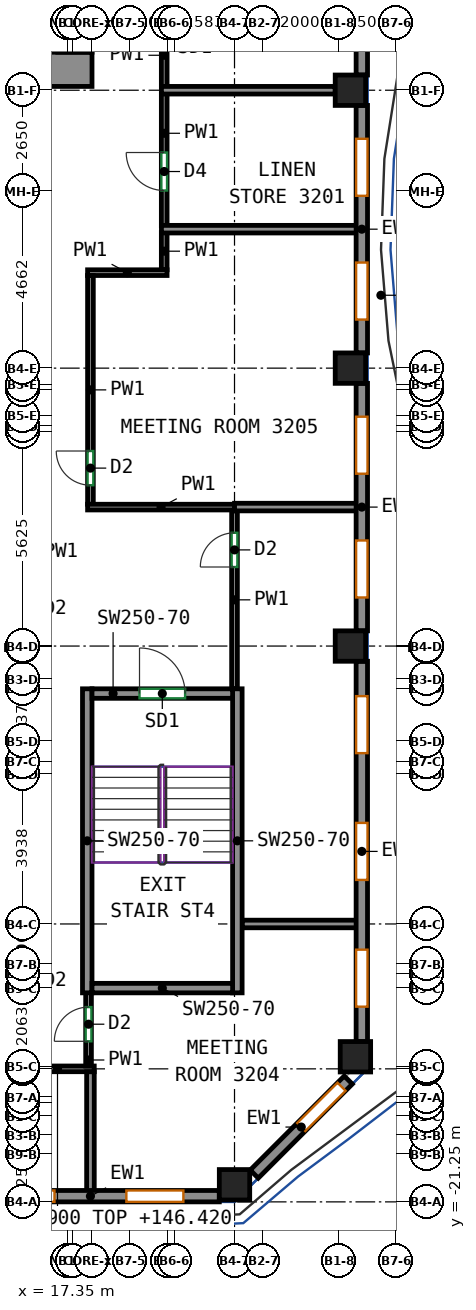
"""IFC4 building model, lengths in metres.
Left out: names, types, materials, properties, quantities, classifications, styles, units other than length and angle.
Written with IfcOpenShell. Run it as: python <this file> out.ifc"""

import sys

from ifc_helpers import new_model, si_unit, direction, frame, frame_2d, origin, origin_2d, place, context, subcontext, project, spatial, rectangle, extrude, source, transform, mapped, element, fill, save


model = new_model("IFC4")
c1 = context("Model", 3, precision=1e-05, world=origin(), true_north=direction((0.0, 1.0)))
c2 = subcontext(c1, "Body", "Model", "MODEL_VIEW")
j1 = project(units=[si_unit("LENGTHUNIT", "METRE"), si_unit("PLANEANGLEUNIT", "RADIAN")], contexts=[c1])
p1 = place(None, origin())
s1 = spatial("IfcSite", under=j1, at=p1, CompositionType="ELEMENT")
p2 = place(p1, origin())
s2 = spatial("IfcBuilding", under=s1, at=p2, CompositionType="ELEMENT")
p3 = place(p2, frame((0.0, 0.0, 143.9)))
s3 = spatial("IfcBuildingStorey", under=s2, at=p3, CompositionType="ELEMENT", Elevation=143.9)
m1 = source(origin(), c2, "Body", "SweptSolid", [
    extrude(rectangle(XDim=0.8, YDim=0.8, at=origin_2d()), origin(), (0.0, 0.0, 1.0), 3.12),
])
for number, where, z_axis, x_axis in (
    (1, (21.75, -20.8, 0.0), (0.0, 0.0, 1.0), (1.0, 0.0, 0.0)),
    (2, (24.8, -6.625, 0.0), (0.0, 0.0, 1.0), (1.0, 0.0, 0.0)),
    (3, (24.8, 0.688, 0.0), (0.0, 0.0, 1.0), (1.0, 0.0, 0.0)),
    (4, (24.8, 8.0, 0.0), (0.0, 0.0, 1.0), (1.0, 0.0, 0.0)),
    (5, (24.932, -17.432, 0.0), (0.0, 0.0, 1.0), (1.0, 0.0, 0.0)),
):
    element("IfcColumn", number, at=place(p3, frame(where, z_axis=z_axis, x_axis=x_axis)), inside=s3, PredefinedType="COLUMN", context=c2, shape_type="MappedRepresentation", body=[
        mapped(m1, transform((0.0, 0.0, 0.0))),
    ])
m2 = source(origin(), c2, "Body", "SweptSolid", [
    extrude(rectangle(XDim=5.53, YDim=0.9, at=frame_2d((2.765, 0.0))), origin(), (0.0, 0.0, 1.0), 3.12),
])
p4 = place(p3, frame((12.47, 8.55, 0.0), z_axis=(0.0, 0.0, 1.0), x_axis=(1.0, 0.0, 0.0)))
e6 = element("IfcWall", 6, at=p4, inside=s3, PredefinedType="SHEAR", context=c2, shape_type="MappedRepresentation", body=[
    mapped(m2, transform((0.0, 0.0, 0.0))),
])
p5 = place(p4, frame((2.18, 0.0, 0.0)))
e7 = element("IfcOpeningElement", 7, at=p5, cuts=e6, PredefinedType="OPENING", context=c2, shape_type="SweptSolid", body=[
    extrude(rectangle(XDim=1.2, YDim=2.1, at=frame_2d((0.6, 1.05))), frame((0.0, 0.46, 0.0), z_axis=(0.0, -1.0, 0.0), x_axis=(1.0, 0.0, 0.0)), (0.0, 0.0, 1.0), 0.92),
])
m3 = source(origin(), c2, "Body", "SweptSolid", [
    extrude(rectangle(XDim=8.0, YDim=0.25, at=frame_2d((4.0, 0.0))), origin(), (0.0, 0.0, 1.0), 3.12),
])
for number, where, z_axis, x_axis in (
    (8, (17.875, -15.75, 0.0), (0.0, 0.0, 1.0), (0.0, 1.0, 0.0)),
    (9, (21.825, -15.75, 0.0), (0.0, 0.0, 1.0), (0.0, 1.0, 0.0)),
):
    element("IfcWall", number, at=place(p3, frame(where, z_axis=z_axis, x_axis=x_axis)), inside=s3, PredefinedType="SHEAR", context=c2, shape_type="MappedRepresentation", body=[
        mapped(m3, transform((0.0, 0.0, 0.0))),
    ])
m4 = source(origin(), c2, "Body", "SweptSolid", [
    extrude(rectangle(XDim=3.7, YDim=0.25, at=frame_2d((1.85, 0.0))), origin(), (0.0, 0.0, 1.0), 3.12),
])
p6 = place(p3, frame((18.0, -15.625, 0.0), z_axis=(0.0, 0.0, 1.0), x_axis=(1.0, 0.0, 0.0)))
e10 = element("IfcWall", 10, at=p6, inside=s3, PredefinedType="SHEAR", context=c2, shape_type="MappedRepresentation", body=[
    mapped(m4, transform((0.0, 0.0, 0.0))),
])
p7 = place(p3, frame((18.0, -7.875, 0.0), z_axis=(0.0, 0.0, 1.0), x_axis=(1.0, 0.0, 0.0)))
e11 = element("IfcWall", 11, at=p7, inside=s3, PredefinedType="SHEAR", context=c2, shape_type="MappedRepresentation", body=[
    mapped(m4, transform((0.0, 0.0, 0.0))),
])
p8 = place(p7, frame((1.25, 0.0, 0.0)))
e12 = element("IfcOpeningElement", 12, at=p8, cuts=e11, PredefinedType="OPENING", context=c2, shape_type="SweptSolid", body=[
    extrude(rectangle(XDim=1.2, YDim=2.1, at=frame_2d((0.6, 1.05))), frame((0.0, 0.135, 0.0), z_axis=(0.0, -1.0, 0.0), x_axis=(1.0, 0.0, 0.0)), (0.0, 0.0, 1.0), 0.27),
])
m5 = source(origin(), c2, "Body", "SweptSolid", [
    extrude(rectangle(XDim=6.783, YDim=0.3, at=frame_2d((3.392, 0.0))), origin(), (0.0, 0.0, 1.0), 3.12),
])
p9 = place(p3, frame((14.567, -21.1, 0.0), z_axis=(0.0, 0.0, 1.0), x_axis=(1.0, 0.0, 0.0)))
e13 = element("IfcWall", 13, at=p9, inside=s3, PredefinedType="SOLIDWALL", context=c2, shape_type="MappedRepresentation", body=[
    mapped(m5, transform((0.0, 0.0, 0.0))),
])
p10 = place(p9, frame((0.946, 0.0, 0.85)))
e14 = element("IfcOpeningElement", 14, at=p10, cuts=e13, PredefinedType="OPENING", context=c2, shape_type="SweptSolid", body=[
    extrude(rectangle(XDim=1.5, YDim=1.95, at=frame_2d((0.75, 0.975))), frame((0.0, 0.16, 0.0), z_axis=(0.0, -1.0, 0.0), x_axis=(1.0, 0.0, 0.0)), (0.0, 0.0, 1.0), 0.32),
])
p11 = place(p9, frame((4.337, 0.0, 0.85)))
e15 = element("IfcOpeningElement", 15, at=p11, cuts=e13, PredefinedType="OPENING", context=c2, shape_type="SweptSolid", body=[
    extrude(rectangle(XDim=1.5, YDim=1.95, at=frame_2d((0.75, 0.975))), frame((0.0, 0.16, 0.0), z_axis=(0.0, -1.0, 0.0), x_axis=(1.0, 0.0, 0.0)), (0.0, 0.0, 1.0), 0.32),
])
m6 = source(origin(), c2, "Body", "SweptSolid", [
    extrude(rectangle(XDim=3.5, YDim=0.3, at=frame_2d((1.75, 0.0))), origin(), (0.0, 0.0, 1.0), 3.12),
])
p12 = place(p3, frame((22.269, -20.519, 0.0), z_axis=(0.0, 0.0, 1.0), x_axis=(0.707141656123, 0.70707190453, 0.0)))
e16 = element("IfcWall", 16, at=p12, inside=s3, PredefinedType="SOLIDWALL", context=c2, shape_type="MappedRepresentation", body=[
    mapped(m6, transform((0.0, 0.0, 0.0))),
])
p13 = place(p12, frame((1.75, 0.0, 0.85)))
e17 = element("IfcOpeningElement", 17, at=p13, cuts=e16, PredefinedType="OPENING", context=c2, shape_type="SweptSolid", body=[
    extrude(rectangle(XDim=1.5, YDim=1.95, at=frame_2d((0.75, 0.975))), frame((0.0, 0.16, 0.0), z_axis=(0.0, -1.0, 0.0), x_axis=(1.0, 0.0, 0.0)), (0.0, 0.0, 1.0), 0.32),
])
m7 = source(origin(), c2, "Body", "SweptSolid", [
    extrude(rectangle(XDim=10.007, YDim=0.3, at=frame_2d((5.003, 0.0))), origin(), (0.0, 0.0, 1.0), 3.12),
])
p14 = place(p3, frame((25.1, -17.032, 0.0), z_axis=(0.0, 0.0, 1.0), x_axis=(0.0, 1.0, 0.0)))
e18 = element("IfcWall", 18, at=p14, inside=s3, PredefinedType="SOLIDWALL", context=c2, shape_type="MappedRepresentation", body=[
    mapped(m7, transform((0.0, 0.0, 0.0))),
])
p15 = place(p14, frame((0.918, 0.0, 0.85)))
e19 = element("IfcOpeningElement", 19, at=p15, cuts=e18, PredefinedType="OPENING", context=c2, shape_type="SweptSolid", body=[
    extrude(rectangle(XDim=1.5, YDim=1.95, at=frame_2d((0.75, 0.975))), frame((0.0, 0.16, 0.0), z_axis=(0.0, -1.0, 0.0), x_axis=(1.0, 0.0, 0.0)), (0.0, 0.0, 1.0), 0.32),
])
p16 = place(p14, frame((4.253, 0.0, 0.85)))
e20 = element("IfcOpeningElement", 20, at=p16, cuts=e18, PredefinedType="OPENING", context=c2, shape_type="SweptSolid", body=[
    extrude(rectangle(XDim=1.5, YDim=1.95, at=frame_2d((0.75, 0.975))), frame((0.0, 0.16, 0.0), z_axis=(0.0, -1.0, 0.0), x_axis=(1.0, 0.0, 0.0)), (0.0, 0.0, 1.0), 0.32),
])
p17 = place(p14, frame((7.589, 0.0, 0.85)))
e21 = element("IfcOpeningElement", 21, at=p17, cuts=e18, PredefinedType="OPENING", context=c2, shape_type="SweptSolid", body=[
    extrude(rectangle(XDim=1.5, YDim=1.95, at=frame_2d((0.75, 0.975))), frame((0.0, 0.16, 0.0), z_axis=(0.0, -1.0, 0.0), x_axis=(1.0, 0.0, 0.0)), (0.0, 0.0, 1.0), 0.32),
])
m8 = source(origin(), c2, "Body", "SweptSolid", [
    extrude(rectangle(XDim=6.513, YDim=0.3, at=frame_2d((3.256, 0.0))), origin(), (0.0, 0.0, 1.0), 3.12),
])
p18 = place(p3, frame((25.1, -6.225, 0.0), z_axis=(0.0, 0.0, 1.0), x_axis=(0.0, 1.0, 0.0)))
e22 = element("IfcWall", 22, at=p18, inside=s3, PredefinedType="SOLIDWALL", context=c2, shape_type="MappedRepresentation", body=[
    mapped(m8, transform((0.0, 0.0, 0.0))),
])
p19 = place(p18, frame((0.878, 0.0, 0.85)))
e23 = element("IfcOpeningElement", 23, at=p19, cuts=e22, PredefinedType="OPENING", context=c2, shape_type="SweptSolid", body=[
    extrude(rectangle(XDim=1.5, YDim=1.95, at=frame_2d((0.75, 0.975))), frame((0.0, 0.16, 0.0), z_axis=(0.0, -1.0, 0.0), x_axis=(1.0, 0.0, 0.0)), (0.0, 0.0, 1.0), 0.32),
])
p20 = place(p18, frame((4.135, 0.0, 0.85)))
e24 = element("IfcOpeningElement", 24, at=p20, cuts=e22, PredefinedType="OPENING", context=c2, shape_type="SweptSolid", body=[
    extrude(rectangle(XDim=1.5, YDim=1.95, at=frame_2d((0.75, 0.975))), frame((0.0, 0.16, 0.0), z_axis=(0.0, -1.0, 0.0), x_axis=(1.0, 0.0, 0.0)), (0.0, 0.0, 1.0), 0.32),
])
p21 = place(p3, frame((25.1, 1.087, 0.0), z_axis=(0.0, 0.0, 1.0), x_axis=(0.0, 1.0, 0.0)))
e25 = element("IfcWall", 25, at=p21, inside=s3, PredefinedType="SOLIDWALL", context=c2, shape_type="MappedRepresentation", body=[
    mapped(m8, transform((0.0, 0.0, 0.0))),
])
p22 = place(p21, frame((0.878, 0.0, 0.85)))
e26 = element("IfcOpeningElement", 26, at=p22, cuts=e25, PredefinedType="OPENING", context=c2, shape_type="SweptSolid", body=[
    extrude(rectangle(XDim=1.5, YDim=1.95, at=frame_2d((0.75, 0.975))), frame((0.0, 0.16, 0.0), z_axis=(0.0, -1.0, 0.0), x_axis=(1.0, 0.0, 0.0)), (0.0, 0.0, 1.0), 0.32),
])
p23 = place(p21, frame((4.135, 0.0, 0.85)))
e27 = element("IfcOpeningElement", 27, at=p23, cuts=e25, PredefinedType="OPENING", context=c2, shape_type="SweptSolid", body=[
    extrude(rectangle(XDim=1.5, YDim=1.95, at=frame_2d((0.75, 0.975))), frame((0.0, 0.16, 0.0), z_axis=(0.0, -1.0, 0.0), x_axis=(1.0, 0.0, 0.0)), (0.0, 0.0, 1.0), 0.32),
])
m9 = source(origin(), c2, "Body", "SweptSolid", [
    extrude(rectangle(XDim=13.2, YDim=0.3, at=frame_2d((6.6, 0.0))), origin(), (0.0, 0.0, 1.0), 3.12),
])
p24 = place(p3, frame((25.1, 8.4, 0.0), z_axis=(0.0, 0.0, 1.0), x_axis=(0.0, 1.0, 0.0)))
e28 = element("IfcWall", 28, at=p24, inside=s3, PredefinedType="SOLIDWALL", context=c2, shape_type="MappedRepresentation", body=[
    mapped(m9, transform((0.0, 0.0, 0.0))),
])
p25 = place(p24, frame((0.9, 0.0, 0.85)))
e29 = element("IfcOpeningElement", 29, at=p25, cuts=e28, PredefinedType="OPENING", context=c2, shape_type="SweptSolid", body=[
    extrude(rectangle(XDim=1.5, YDim=1.95, at=frame_2d((0.75, 0.975))), frame((0.0, 0.16, 0.0), z_axis=(0.0, -1.0, 0.0), x_axis=(1.0, 0.0, 0.0)), (0.0, 0.0, 1.0), 0.32),
])
p26 = place(p24, frame((4.2, 0.0, 0.85)))
e30 = element("IfcOpeningElement", 30, at=p26, cuts=e28, PredefinedType="OPENING", context=c2, shape_type="SweptSolid", body=[
    extrude(rectangle(XDim=1.5, YDim=1.95, at=frame_2d((0.75, 0.975))), frame((0.0, 0.16, 0.0), z_axis=(0.0, -1.0, 0.0), x_axis=(1.0, 0.0, 0.0)), (0.0, 0.0, 1.0), 0.32),
])
p27 = place(p24, frame((7.5, 0.0, 0.85)))
e31 = element("IfcOpeningElement", 31, at=p27, cuts=e28, PredefinedType="OPENING", context=c2, shape_type="SweptSolid", body=[
    extrude(rectangle(XDim=1.5, YDim=1.95, at=frame_2d((0.75, 0.975))), frame((0.0, 0.16, 0.0), z_axis=(0.0, -1.0, 0.0), x_axis=(1.0, 0.0, 0.0)), (0.0, 0.0, 1.0), 0.32),
])
p28 = place(p24, frame((10.8, 0.0, 0.85)))
e32 = element("IfcOpeningElement", 32, at=p28, cuts=e28, PredefinedType="OPENING", context=c2, shape_type="SweptSolid", body=[
    extrude(rectangle(XDim=1.5, YDim=1.95, at=frame_2d((0.75, 0.975))), frame((0.0, 0.16, 0.0), z_axis=(0.0, -1.0, 0.0), x_axis=(1.0, 0.0, 0.0)), (0.0, 0.0, 1.0), 0.32),
])
p29 = place(p3, frame((16.125, -17.75, 0.0), z_axis=(0.0, 0.0, 1.0), x_axis=(1.0, 0.0, 0.0)))
e33 = element("IfcWall", 33, at=p29, inside=s3, PredefinedType="PARTITIONING", context=c2, shape_type="SweptSolid", body=[
    extrude(rectangle(XDim=1.934, YDim=0.15, at=frame_2d((0.967, 0.0))), origin(), (0.0, 0.0, 1.0), 2.52),
])
p30 = place(p3, frame((17.909, -17.675, 0.0), z_axis=(0.0, 0.0, 1.0), x_axis=(0.0, 1.0, 0.0)))
e34 = element("IfcWall", 34, at=p30, inside=s3, PredefinedType="PARTITIONING", context=c2, shape_type="SweptSolid", body=[
    extrude(rectangle(XDim=1.975, YDim=0.15, at=frame_2d((0.988, 0.0))), origin(), (0.0, 0.0, 1.0), 3.12),
])
p31 = place(p30, frame((0.65, 0.0, 0.0)))
e35 = element("IfcOpeningElement", 35, at=p31, cuts=e34, PredefinedType="OPENING", context=c2, shape_type="SweptSolid", body=[
    extrude(rectangle(XDim=0.9, YDim=2.1, at=frame_2d((0.45, 1.05))), frame((0.0, 0.085, 0.0), z_axis=(0.0, -1.0, 0.0), x_axis=(1.0, 0.0, 0.0)), (0.0, 0.0, 1.0), 0.17),
])
p32 = place(p3, frame((19.9, 4.434, 0.0), z_axis=(0.0, 0.0, 1.0), x_axis=(0.0, 1.0, 0.0)))
e36 = element("IfcWall", 36, at=p32, inside=s3, PredefinedType="PARTITIONING", context=c2, shape_type="SweptSolid", body=[
    extrude(rectangle(XDim=3.476, YDim=0.15, at=frame_2d((1.738, 0.0))), origin(), (0.0, 0.0, 1.0), 3.12),
])
p33 = place(p32, frame((0.927, 0.0, 0.0)))
e37 = element("IfcOpeningElement", 37, at=p33, cuts=e36, PredefinedType="OPENING", context=c2, shape_type="SweptSolid", body=[
    extrude(rectangle(XDim=1.0, YDim=2.1, at=frame_2d((0.5, 1.05))), frame((0.0, 0.085, 0.0), z_axis=(0.0, -1.0, 0.0), x_axis=(1.0, 0.0, 0.0)), (0.0, 0.0, 1.0), 0.17),
])
p34 = place(p3, frame((19.9, 8.09, 0.0), z_axis=(0.0, 0.0, 1.0), x_axis=(0.0, 1.0, 0.0)))
e38 = element("IfcWall", 38, at=p34, inside=s3, PredefinedType="PARTITIONING", context=c2, shape_type="SweptSolid", body=[
    extrude(rectangle(XDim=1.66, YDim=0.15, at=frame_2d((0.83, 0.0))), origin(), (0.0, 0.0, 1.0), 3.12),
])
p35 = place(p3, frame((19.9, 3.275, 0.0), z_axis=(0.0, 0.0, 1.0), x_axis=(0.0, 1.0, 0.0)))
e39 = element("IfcWall", 39, at=p35, inside=s3, PredefinedType="PARTITIONING", context=c2, shape_type="SweptSolid", body=[
    extrude(rectangle(XDim=0.979, YDim=0.15, at=frame_2d((0.49, 0.0))), origin(), (0.0, 0.0, 1.0), 3.12),
])
p36 = place(p3, frame((17.884, 3.2, 0.0), z_axis=(0.0, 0.0, 1.0), x_axis=(1.0, 0.0, 0.0)))
e40 = element("IfcWall", 40, at=p36, inside=s3, PredefinedType="PARTITIONING", context=c2, shape_type="SweptSolid", body=[
    extrude(rectangle(XDim=2.091, YDim=0.15, at=frame_2d((1.045, 0.0))), origin(), (0.0, 0.0, 1.0), 3.12),
])
p37 = place(p3, frame((17.959, -2.894, 0.0), z_axis=(0.0, 0.0, 1.0), x_axis=(0.0, 1.0, 0.0)))
e41 = element("IfcWall", 41, at=p37, inside=s3, PredefinedType="PARTITIONING", context=c2, shape_type="SweptSolid", body=[
    extrude(rectangle(XDim=6.019, YDim=0.15, at=frame_2d((3.01, 0.0))), origin(), (0.0, 0.0, 1.0), 3.12),
])
p38 = place(p37, frame((0.501, 0.0, 0.0)))
e42 = element("IfcOpeningElement", 42, at=p38, cuts=e41, PredefinedType="OPENING", context=c2, shape_type="SweptSolid", body=[
    extrude(rectangle(XDim=0.9, YDim=2.1, at=frame_2d((0.45, 1.05))), frame((0.0, 0.085, 0.0), z_axis=(0.0, -1.0, 0.0), x_axis=(1.0, 0.0, 0.0)), (0.0, 0.0, 1.0), 0.17),
])
p39 = place(p3, frame((21.751, -2.969, 0.0), z_axis=(0.0, 0.0, 1.0), x_axis=(-1.0, 0.0, 0.0)))
e43 = element("IfcWall", 43, at=p39, inside=s3, PredefinedType="PARTITIONING", context=c2, shape_type="SweptSolid", body=[
    extrude(rectangle(XDim=3.867, YDim=0.15, at=frame_2d((1.934, 0.0))), origin(), (0.0, 0.0, 1.0), 3.12),
])
p40 = place(p3, frame((21.75, -7.75, 0.0), z_axis=(0.0, 0.0, 1.0), x_axis=(0.0, 1.0, 0.0)))
e44 = element("IfcWall", 44, at=p40, inside=s3, PredefinedType="PARTITIONING", context=c2, shape_type="SweptSolid", body=[
    extrude(rectangle(XDim=4.682, YDim=0.15, at=frame_2d((2.341, 0.0))), origin(), (0.0, 0.0, 1.0), 3.12),
])
p41 = place(p40, frame((3.205, 0.0, 0.0)))
e45 = element("IfcOpeningElement", 45, at=p41, cuts=e44, PredefinedType="OPENING", context=c2, shape_type="SweptSolid", body=[
    extrude(rectangle(XDim=0.9, YDim=2.1, at=frame_2d((0.45, 1.05))), frame((0.0, 0.085, 0.0), z_axis=(0.0, -1.0, 0.0), x_axis=(1.0, 0.0, 0.0)), (0.0, 0.0, 1.0), 0.17),
])
p42 = place(p3, frame((17.959, -21.0, 0.0), z_axis=(0.0, 0.0, 1.0), x_axis=(0.0, 1.0, 0.0)))
e46 = element("IfcWall", 46, at=p42, inside=s3, PredefinedType="PARTITIONING", context=c2, shape_type="SweptSolid", body=[
    extrude(rectangle(XDim=3.173, YDim=0.2, at=frame_2d((1.586, 0.0))), origin(), (0.0, 0.0, 1.0), 3.12),
])
p43 = place(p3, frame((25.0, -13.938, 0.0), z_axis=(0.0, 0.0, 1.0), x_axis=(-1.0, 0.0, 0.0)))
e47 = element("IfcWall", 47, at=p43, inside=s3, PredefinedType="PARTITIONING", context=c2, shape_type="SweptSolid", body=[
    extrude(rectangle(XDim=3.05, YDim=0.2, at=frame_2d((1.525, 0.0))), origin(), (0.0, 0.0, 1.0), 3.12),
])
p44 = place(p3, frame((19.827, 8.0, 0.0), z_axis=(0.0, 0.0, 1.0), x_axis=(1.0, 0.0, 0.0)))
e48 = element("IfcWall", 48, at=p44, inside=s3, PredefinedType="PARTITIONING", context=c2, shape_type="SweptSolid", body=[
    extrude(rectangle(XDim=4.573, YDim=0.2, at=frame_2d((2.287, 0.0))), origin(), (0.0, 0.0, 1.0), 3.12),
])
p45 = place(p3, frame((19.827, 4.344, 0.0), z_axis=(0.0, 0.0, 1.0), x_axis=(1.0, 0.0, 0.0)))
e49 = element("IfcWall", 49, at=p45, inside=s3, PredefinedType="PARTITIONING", context=c2, shape_type="SweptSolid", body=[
    extrude(rectangle(XDim=5.173, YDim=0.2, at=frame_2d((2.586, 0.0))), origin(), (0.0, 0.0, 1.0), 3.12),
])
p46 = place(p3, frame((21.751, -2.968, 0.0), z_axis=(0.0, 0.0, 1.0), x_axis=(0.999999954829, -0.000300571071, 0.0)))
e50 = element("IfcWall", 50, at=p46, inside=s3, PredefinedType="PARTITIONING", context=c2, shape_type="SweptSolid", body=[
    extrude(rectangle(XDim=3.249, YDim=0.2, at=frame_2d((1.625, 0.0))), origin(), (0.0, 0.0, 1.0), 3.12),
])
p47 = place(p10, origin())
e51 = element("IfcWindow", 51, at=p47, inside=s3, PartitioningType="SINGLE_PANEL", PredefinedType="WINDOW", context=c2, shape_type="SweptSolid", body=[
    extrude(rectangle(XDim=1.5, YDim=1.95, at=frame_2d((0.75, 0.975))), frame((0.0, 0.03, 0.0), z_axis=(0.0, -1.0, 0.0), x_axis=(1.0, 0.0, 0.0)), (0.0, 0.0, 1.0), 0.06),
])
fill(e14, e51)
p48 = place(p11, origin())
e52 = element("IfcWindow", 52, at=p48, inside=s3, PartitioningType="SINGLE_PANEL", PredefinedType="WINDOW", context=c2, shape_type="SweptSolid", body=[
    extrude(rectangle(XDim=1.5, YDim=1.95, at=frame_2d((0.75, 0.975))), frame((0.0, 0.03, 0.0), z_axis=(0.0, -1.0, 0.0), x_axis=(1.0, 0.0, 0.0)), (0.0, 0.0, 1.0), 0.06),
])
fill(e15, e52)
p49 = place(p13, origin())
e53 = element("IfcWindow", 53, at=p49, inside=s3, PartitioningType="SINGLE_PANEL", PredefinedType="WINDOW", context=c2, shape_type="SweptSolid", body=[
    extrude(rectangle(XDim=1.5, YDim=1.95, at=frame_2d((0.75, 0.975))), frame((0.0, 0.03, 0.0), z_axis=(0.0, -1.0, 0.0), x_axis=(1.0, 0.0, 0.0)), (0.0, 0.0, 1.0), 0.06),
])
fill(e17, e53)
p50 = place(p15, origin())
e54 = element("IfcWindow", 54, at=p50, inside=s3, PartitioningType="SINGLE_PANEL", PredefinedType="WINDOW", context=c2, shape_type="SweptSolid", body=[
    extrude(rectangle(XDim=1.5, YDim=1.95, at=frame_2d((0.75, 0.975))), frame((0.0, 0.03, 0.0), z_axis=(0.0, -1.0, 0.0), x_axis=(1.0, 0.0, 0.0)), (0.0, 0.0, 1.0), 0.06),
])
fill(e19, e54)
p51 = place(p16, origin())
e55 = element("IfcWindow", 55, at=p51, inside=s3, PartitioningType="SINGLE_PANEL", PredefinedType="WINDOW", context=c2, shape_type="SweptSolid", body=[
    extrude(rectangle(XDim=1.5, YDim=1.95, at=frame_2d((0.75, 0.975))), frame((0.0, 0.03, 0.0), z_axis=(0.0, -1.0, 0.0), x_axis=(1.0, 0.0, 0.0)), (0.0, 0.0, 1.0), 0.06),
])
fill(e20, e55)
p52 = place(p17, origin())
e56 = element("IfcWindow", 56, at=p52, inside=s3, PartitioningType="SINGLE_PANEL", PredefinedType="WINDOW", context=c2, shape_type="SweptSolid", body=[
    extrude(rectangle(XDim=1.5, YDim=1.95, at=frame_2d((0.75, 0.975))), frame((0.0, 0.03, 0.0), z_axis=(0.0, -1.0, 0.0), x_axis=(1.0, 0.0, 0.0)), (0.0, 0.0, 1.0), 0.06),
])
fill(e21, e56)
p53 = place(p19, origin())
e57 = element("IfcWindow", 57, at=p53, inside=s3, PartitioningType="SINGLE_PANEL", PredefinedType="WINDOW", context=c2, shape_type="SweptSolid", body=[
    extrude(rectangle(XDim=1.5, YDim=1.95, at=frame_2d((0.75, 0.975))), frame((0.0, 0.03, 0.0), z_axis=(0.0, -1.0, 0.0), x_axis=(1.0, 0.0, 0.0)), (0.0, 0.0, 1.0), 0.06),
])
fill(e23, e57)
p54 = place(p20, origin())
e58 = element("IfcWindow", 58, at=p54, inside=s3, PartitioningType="SINGLE_PANEL", PredefinedType="WINDOW", context=c2, shape_type="SweptSolid", body=[
    extrude(rectangle(XDim=1.5, YDim=1.95, at=frame_2d((0.75, 0.975))), frame((0.0, 0.03, 0.0), z_axis=(0.0, -1.0, 0.0), x_axis=(1.0, 0.0, 0.0)), (0.0, 0.0, 1.0), 0.06),
])
fill(e24, e58)
p55 = place(p22, origin())
e59 = element("IfcWindow", 59, at=p55, inside=s3, PartitioningType="SINGLE_PANEL", PredefinedType="WINDOW", context=c2, shape_type="SweptSolid", body=[
    extrude(rectangle(XDim=1.5, YDim=1.95, at=frame_2d((0.75, 0.975))), frame((0.0, 0.03, 0.0), z_axis=(0.0, -1.0, 0.0), x_axis=(1.0, 0.0, 0.0)), (0.0, 0.0, 1.0), 0.06),
])
fill(e26, e59)
p56 = place(p23, origin())
e60 = element("IfcWindow", 60, at=p56, inside=s3, PartitioningType="SINGLE_PANEL", PredefinedType="WINDOW", context=c2, shape_type="SweptSolid", body=[
    extrude(rectangle(XDim=1.5, YDim=1.95, at=frame_2d((0.75, 0.975))), frame((0.0, 0.03, 0.0), z_axis=(0.0, -1.0, 0.0), x_axis=(1.0, 0.0, 0.0)), (0.0, 0.0, 1.0), 0.06),
])
fill(e27, e60)
p57 = place(p8, origin())
e61 = element("IfcDoor", 61, at=p57, inside=s3, OperationType="DOUBLE_DOOR_SINGLE_SWING", PredefinedType="DOOR", context=c2, shape_type="SweptSolid", body=[
    extrude(rectangle(XDim=1.2, YDim=2.1, at=frame_2d((0.6, 1.05))), frame((0.0, 0.025, 0.0), z_axis=(0.0, -1.0, 0.0), x_axis=(1.0, 0.0, 0.0)), (0.0, 0.0, 1.0), 0.05),
])
fill(e12, e61)
p58 = place(p31, origin())
e62 = element("IfcDoor", 62, at=p58, inside=s3, OperationType="SINGLE_SWING_LEFT", PredefinedType="DOOR", context=c2, shape_type="SweptSolid", body=[
    extrude(rectangle(XDim=0.9, YDim=2.1, at=frame_2d((0.45, 1.05))), frame((0.0, 0.025, 0.0), z_axis=(0.0, -1.0, 0.0), x_axis=(1.0, 0.0, 0.0)), (0.0, 0.0, 1.0), 0.05),
])
fill(e35, e62)
p59 = place(p41, origin())
e63 = element("IfcDoor", 63, at=p59, inside=s3, OperationType="SINGLE_SWING_LEFT", PredefinedType="DOOR", context=c2, shape_type="SweptSolid", body=[
    extrude(rectangle(XDim=0.9, YDim=2.1, at=frame_2d((0.45, 1.05))), frame((0.0, 0.025, 0.0), z_axis=(0.0, -1.0, 0.0), x_axis=(1.0, 0.0, 0.0)), (0.0, 0.0, 1.0), 0.05),
])
fill(e45, e63)
p60 = place(p38, origin())
e64 = element("IfcDoor", 64, at=p60, inside=s3, OperationType="SINGLE_SWING_RIGHT", PredefinedType="DOOR", context=c2, shape_type="SweptSolid", body=[
    extrude(rectangle(XDim=0.9, YDim=2.1, at=frame_2d((0.45, 1.05))), frame((0.0, 0.025, 0.0), z_axis=(0.0, -1.0, 0.0), x_axis=(1.0, 0.0, 0.0)), (0.0, 0.0, 1.0), 0.05),
])
fill(e42, e64)
p61 = place(p33, origin())
e65 = element("IfcDoor", 65, at=p61, inside=s3, OperationType="SINGLE_SWING_RIGHT", PredefinedType="DOOR", context=c2, shape_type="SweptSolid", body=[
    extrude(rectangle(XDim=1.0, YDim=2.1, at=frame_2d((0.5, 1.05))), frame((0.0, 0.025, 0.0), z_axis=(0.0, -1.0, 0.0), x_axis=(1.0, 0.0, 0.0)), (0.0, 0.0, 1.0), 0.05),
])
fill(e37, e65)
save(model, sys.argv[1])
